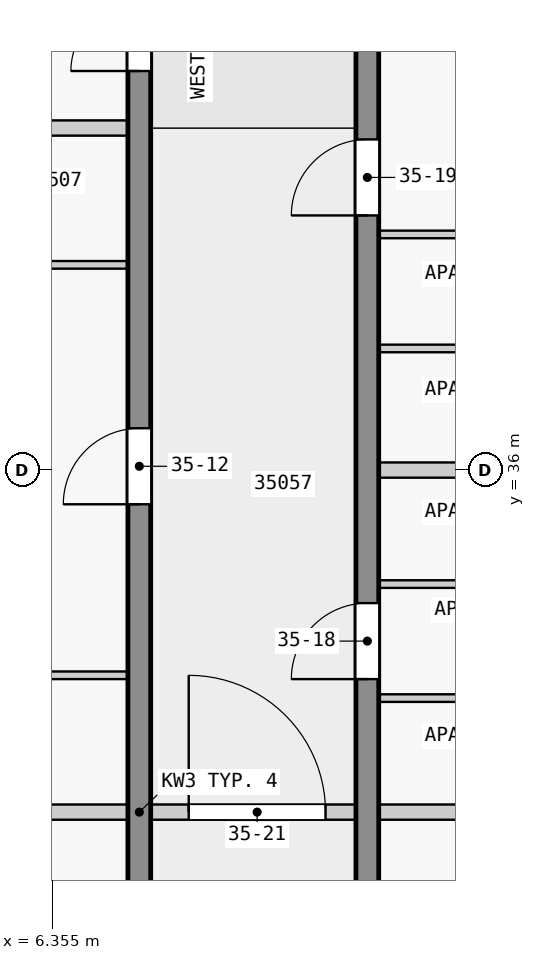
"""IFC4 building model, lengths in metres.
Left out: names, types, materials, properties, quantities, classifications, styles, units other than length and angle.
Written with IfcOpenShell. Run it as: python <this file> out.ifc"""

import sys

from ifc_helpers import new_model, si_unit, direction, frame, frame_2d, origin, place, context, subcontext, project, spatial, rectangle, extrude, element, fill, save


model = new_model("IFC4")
c1 = context("Model", 3, precision=1e-05, world=origin(), true_north=direction((0.0, 1.0)))
c2 = subcontext(c1, "Body", "Model", "MODEL_VIEW")
j1 = project(units=[si_unit("LENGTHUNIT", "METRE"), si_unit("PLANEANGLEUNIT", "RADIAN")], contexts=[c1])
p1 = place(None, origin())
s1 = spatial("IfcSite", under=j1, at=p1, CompositionType="ELEMENT")
p2 = place(p1, origin())
s2 = spatial("IfcBuilding", under=s1, at=p2, CompositionType="ELEMENT")
p3 = place(p2, frame((0.0, 0.0, 139.4)))
s3 = spatial("IfcBuildingStorey", under=s2, at=p3, CompositionType="ELEMENT", Elevation=139.4)
p4 = place(p3, frame((7.5, 18.0, 0.0), z_axis=(0.0, 0.0, 1.0), x_axis=(0.0, 1.0, 0.0)))
e1 = element("IfcWall", 1, at=p4, inside=s3, PredefinedType="SHEAR", context=c2, shape_type="SweptSolid", body=[
    extrude(rectangle(XDim=27.0, YDim=0.3, at=frame_2d((13.5, 0.0))), origin(), (0.0, 0.0, 1.0), 3.25),
])
p5 = place(p4, frame((4.05, 0.0, 0.0)))
e2 = element("IfcOpeningElement", 2, at=p5, cuts=e1, PredefinedType="OPENING", context=c2, shape_type="SweptSolid", body=[
    extrude(rectangle(XDim=1.0, YDim=2.1, at=frame_2d((0.5, 1.05))), frame((0.0, 0.16, 0.0), z_axis=(0.0, -1.0, 0.0), x_axis=(1.0, 0.0, 0.0)), (0.0, 0.0, 1.0), 0.32),
])
p6 = place(p4, frame((10.75, 0.0, 0.0)))
e3 = element("IfcOpeningElement", 3, at=p6, cuts=e1, PredefinedType="OPENING", context=c2, shape_type="SweptSolid", body=[
    extrude(rectangle(XDim=1.0, YDim=2.1, at=frame_2d((0.5, 1.05))), frame((0.0, 0.16, 0.0), z_axis=(0.0, -1.0, 0.0), x_axis=(1.0, 0.0, 0.0)), (0.0, 0.0, 1.0), 0.32),
])
p7 = place(p4, frame((17.55, 0.0, 0.0)))
e4 = element("IfcOpeningElement", 4, at=p7, cuts=e1, PredefinedType="OPENING", context=c2, shape_type="SweptSolid", body=[
    extrude(rectangle(XDim=1.0, YDim=2.1, at=frame_2d((0.5, 1.05))), frame((0.0, 0.16, 0.0), z_axis=(0.0, -1.0, 0.0), x_axis=(1.0, 0.0, 0.0)), (0.0, 0.0, 1.0), 0.32),
])
p8 = place(p4, frame((23.25, 0.0, 0.0)))
e5 = element("IfcOpeningElement", 5, at=p8, cuts=e1, PredefinedType="OPENING", context=c2, shape_type="SweptSolid", body=[
    extrude(rectangle(XDim=0.9, YDim=2.1, at=frame_2d((0.45, 1.05))), frame((0.0, 0.16, 0.0), z_axis=(0.0, -1.0, 0.0), x_axis=(1.0, 0.0, 0.0)), (0.0, 0.0, 1.0), 0.32),
])
p9 = place(p4, frame((25.45, 0.0, 0.0)))
e6 = element("IfcOpeningElement", 6, at=p9, cuts=e1, PredefinedType="OPENING", context=c2, shape_type="SweptSolid", body=[
    extrude(rectangle(XDim=1.0, YDim=2.1, at=frame_2d((0.5, 1.05))), frame((0.0, 0.16, 0.0), z_axis=(0.0, -1.0, 0.0), x_axis=(1.0, 0.0, 0.0)), (0.0, 0.0, 1.0), 0.32),
])
p10 = place(p3, frame((10.5, 18.0, 0.0), z_axis=(0.0, 0.0, 1.0), x_axis=(0.0, 1.0, 0.0)))
e7 = element("IfcWall", 7, at=p10, inside=s3, PredefinedType="SHEAR", context=c2, shape_type="SweptSolid", body=[
    extrude(rectangle(XDim=27.0, YDim=0.3, at=frame_2d((13.5, 0.0))), origin(), (0.0, 0.0, 1.0), 3.25),
])
p11 = place(p10, frame((1.75, 0.0, 0.0)))
e8 = element("IfcOpeningElement", 8, at=p11, cuts=e7, PredefinedType="OPENING", context=c2, shape_type="SweptSolid", body=[
    extrude(rectangle(XDim=1.0, YDim=2.1, at=frame_2d((0.5, 1.05))), frame((0.0, 0.16, 0.0), z_axis=(0.0, -1.0, 0.0), x_axis=(1.0, 0.0, 0.0)), (0.0, 0.0, 1.0), 0.32),
])
p12 = place(p10, frame((6.25, 0.0, 0.0)))
e9 = element("IfcOpeningElement", 9, at=p12, cuts=e7, PredefinedType="OPENING", context=c2, shape_type="SweptSolid", body=[
    extrude(rectangle(XDim=1.0, YDim=2.1, at=frame_2d((0.5, 1.05))), frame((0.0, 0.16, 0.0), z_axis=(0.0, -1.0, 0.0), x_axis=(1.0, 0.0, 0.0)), (0.0, 0.0, 1.0), 0.32),
])
p13 = place(p10, frame((10.35, 0.0, 0.0)))
e10 = element("IfcOpeningElement", 10, at=p13, cuts=e7, PredefinedType="OPENING", context=c2, shape_type="SweptSolid", body=[
    extrude(rectangle(XDim=1.8, YDim=2.1, at=frame_2d((0.9, 1.05))), frame((0.0, 0.16, 0.0), z_axis=(0.0, -1.0, 0.0), x_axis=(1.0, 0.0, 0.0)), (0.0, 0.0, 1.0), 0.32),
])
p14 = place(p10, frame((15.25, 0.0, 0.0)))
e11 = element("IfcOpeningElement", 11, at=p14, cuts=e7, PredefinedType="OPENING", context=c2, shape_type="SweptSolid", body=[
    extrude(rectangle(XDim=1.0, YDim=2.1, at=frame_2d((0.5, 1.05))), frame((0.0, 0.16, 0.0), z_axis=(0.0, -1.0, 0.0), x_axis=(1.0, 0.0, 0.0)), (0.0, 0.0, 1.0), 0.32),
])
p15 = place(p10, frame((21.35, 0.0, 0.0)))
e12 = element("IfcOpeningElement", 12, at=p15, cuts=e7, PredefinedType="OPENING", context=c2, shape_type="SweptSolid", body=[
    extrude(rectangle(XDim=1.0, YDim=2.1, at=frame_2d((0.5, 1.05))), frame((0.0, 0.16, 0.0), z_axis=(0.0, -1.0, 0.0), x_axis=(1.0, 0.0, 0.0)), (0.0, 0.0, 1.0), 0.32),
])
p16 = place(p3, frame((7.35, 31.5, 0.0), z_axis=(0.0, 0.0, 1.0), x_axis=(-1.0, 0.0, 0.0)))
e13 = element("IfcWall", 13, at=p16, inside=s3, PredefinedType="PARTITIONING", context=c2, shape_type="SweptSolid", body=[
    extrude(rectangle(XDim=3.3, YDim=0.2, at=frame_2d((1.65, 0.0))), origin(), (0.0, 0.0, 1.0), 3.25),
])
p17 = place(p3, frame((17.85, 31.5, 0.0), z_axis=(0.0, 0.0, 1.0), x_axis=(-1.0, 0.0, 0.0)))
e14 = element("IfcWall", 14, at=p17, inside=s3, PredefinedType="PARTITIONING", context=c2, shape_type="SweptSolid", body=[
    extrude(rectangle(XDim=7.2, YDim=0.2, at=frame_2d((3.6, 0.0))), origin(), (0.0, 0.0, 1.0), 3.25),
])
p18 = place(p3, frame((14.05, 33.0, 0.0), z_axis=(0.0, 0.0, 1.0), x_axis=(-1.0, 0.0, 0.0)))
e15 = element("IfcWall", 15, at=p18, inside=s3, PredefinedType="PARTITIONING", context=c2, shape_type="SweptSolid", body=[
    extrude(rectangle(XDim=3.4, YDim=0.1, at=frame_2d((1.7, 0.0))), origin(), (0.0, 0.0, 1.0), 3.25),
])
p19 = place(p18, frame((1.25, 0.0, 0.0)))
e16 = element("IfcOpeningElement", 16, at=p19, cuts=e15, PredefinedType="OPENING", context=c2, shape_type="SweptSolid", body=[
    extrude(rectangle(XDim=0.9, YDim=2.1, at=frame_2d((0.45, 1.05))), frame((0.0, 0.06, 0.0), z_axis=(0.0, -1.0, 0.0), x_axis=(1.0, 0.0, 0.0)), (0.0, 0.0, 1.0), 0.12),
])
p20 = place(p3, frame((7.35, 33.3, 0.0), z_axis=(0.0, 0.0, 1.0), x_axis=(-1.0, 0.0, 0.0)))
e17 = element("IfcWall", 17, at=p20, inside=s3, PredefinedType="PARTITIONING", context=c2, shape_type="SweptSolid", body=[
    extrude(rectangle(XDim=3.4, YDim=0.1, at=frame_2d((1.7, 0.0))), origin(), (0.0, 0.0, 1.0), 3.25),
])
p21 = place(p20, frame((1.25, 0.0, 0.0)))
e18 = element("IfcOpeningElement", 18, at=p21, cuts=e17, PredefinedType="OPENING", context=c2, shape_type="SweptSolid", body=[
    extrude(rectangle(XDim=0.9, YDim=2.1, at=frame_2d((0.45, 1.05))), frame((0.0, 0.06, 0.0), z_axis=(0.0, -1.0, 0.0), x_axis=(1.0, 0.0, 0.0)), (0.0, 0.0, 1.0), 0.12),
])
p22 = place(p3, frame((10.65, 34.5, 0.0), z_axis=(0.0, 0.0, 1.0), x_axis=(1.0, 0.0, 0.0)))
e19 = element("IfcWall", 19, at=p22, inside=s3, PredefinedType="PARTITIONING", context=c2, shape_type="SweptSolid", body=[
    extrude(rectangle(XDim=3.35, YDim=0.1, at=frame_2d((1.675, 0.0))), origin(), (0.0, 0.0, 1.0), 3.25),
])
p23 = place(p22, frame((1.25, 0.0, 0.0)))
e20 = element("IfcOpeningElement", 20, at=p23, cuts=e19, PredefinedType="OPENING", context=c2, shape_type="SweptSolid", body=[
    extrude(rectangle(XDim=0.9, YDim=2.1, at=frame_2d((0.45, 1.05))), frame((0.0, 0.06, 0.0), z_axis=(0.0, -1.0, 0.0), x_axis=(1.0, 0.0, 0.0)), (0.0, 0.0, 1.0), 0.12),
])
p24 = place(p3, frame((14.05, 36.0, 0.0), z_axis=(0.0, 0.0, 1.0), x_axis=(-1.0, 0.0, 0.0)))
e21 = element("IfcWall", 21, at=p24, inside=s3, PredefinedType="PARTITIONING", context=c2, shape_type="SweptSolid", body=[
    extrude(rectangle(XDim=3.4, YDim=0.2, at=frame_2d((1.7, 0.0))), origin(), (0.0, 0.0, 1.0), 3.25),
])
p25 = place(p3, frame((14.0, 37.6, 0.0), z_axis=(0.0, 0.0, 1.0), x_axis=(-1.0, 0.0, 0.0)))
e22 = element("IfcWall", 22, at=p25, inside=s3, PredefinedType="PARTITIONING", context=c2, shape_type="SweptSolid", body=[
    extrude(rectangle(XDim=3.35, YDim=0.1, at=frame_2d((1.675, 0.0))), origin(), (0.0, 0.0, 1.0), 3.25),
])
p26 = place(p3, frame((3.95, 38.7, 0.0), z_axis=(0.0, 0.0, 1.0), x_axis=(1.0, 0.0, 0.0)))
e23 = element("IfcWall", 23, at=p26, inside=s3, PredefinedType="PARTITIONING", context=c2, shape_type="SweptSolid", body=[
    extrude(rectangle(XDim=3.4, YDim=0.1, at=frame_2d((1.7, 0.0))), origin(), (0.0, 0.0, 1.0), 3.25),
])
p27 = place(p26, frame((1.25, 0.0, 0.0)))
e24 = element("IfcOpeningElement", 24, at=p27, cuts=e23, PredefinedType="OPENING", context=c2, shape_type="SweptSolid", body=[
    extrude(rectangle(XDim=0.9, YDim=2.1, at=frame_2d((0.45, 1.05))), frame((0.0, 0.06, 0.0), z_axis=(0.0, -1.0, 0.0), x_axis=(1.0, 0.0, 0.0)), (0.0, 0.0, 1.0), 0.12),
])
p28 = place(p3, frame((14.0, 39.1, 0.0), z_axis=(0.0, 0.0, 1.0), x_axis=(-1.0, 0.0, 0.0)))
e25 = element("IfcWall", 25, at=p28, inside=s3, PredefinedType="PARTITIONING", context=c2, shape_type="SweptSolid", body=[
    extrude(rectangle(XDim=3.35, YDim=0.1, at=frame_2d((1.675, 0.0))), origin(), (0.0, 0.0, 1.0), 3.25),
])
p29 = place(p28, frame((1.25, 0.0, 0.0)))
e26 = element("IfcOpeningElement", 26, at=p29, cuts=e25, PredefinedType="OPENING", context=c2, shape_type="SweptSolid", body=[
    extrude(rectangle(XDim=0.9, YDim=2.1, at=frame_2d((0.45, 1.05))), frame((0.0, 0.06, 0.0), z_axis=(0.0, -1.0, 0.0), x_axis=(1.0, 0.0, 0.0)), (0.0, 0.0, 1.0), 0.12),
])
p30 = place(p3, frame((7.35, 40.5, 0.0), z_axis=(0.0, 0.0, 1.0), x_axis=(-1.0, 0.0, 0.0)))
e27 = element("IfcWall", 27, at=p30, inside=s3, PredefinedType="PARTITIONING", context=c2, shape_type="SweptSolid", body=[
    extrude(rectangle(XDim=7.43, YDim=0.2, at=frame_2d((3.715, 0.0))), origin(), (0.0, 0.0, 1.0), 3.25),
])
p31 = place(p3, frame((7.45, 31.5, 0.0), z_axis=(0.0, 0.0, 1.0), x_axis=(1.0, 0.0, 0.0)))
e28 = element("IfcWall", 28, at=p31, inside=s3, PredefinedType="PARTITIONING", context=c2, shape_type="SweptSolid", body=[
    extrude(rectangle(XDim=3.1, YDim=0.2, at=frame_2d((1.55, 0.0))), origin(), (0.0, 0.0, 1.0), 3.25),
])
p32 = place(p31, frame((0.7, 0.0, 0.0)))
e29 = element("IfcOpeningElement", 29, at=p32, cuts=e28, PredefinedType="OPENING", context=c2, shape_type="SweptSolid", body=[
    extrude(rectangle(XDim=1.8, YDim=2.1, at=frame_2d((0.9, 1.05))), frame((0.0, 0.11, 0.0), z_axis=(0.0, -1.0, 0.0), x_axis=(1.0, 0.0, 0.0)), (0.0, 0.0, 1.0), 0.22),
])
p33 = place(p7, origin())
e30 = element("IfcDoor", 30, at=p33, inside=s3, OperationType="SINGLE_SWING_RIGHT", PredefinedType="DOOR", context=c2, shape_type="SweptSolid", body=[
    extrude(rectangle(XDim=1.0, YDim=2.1, at=frame_2d((0.5, 1.05))), frame((0.0, 0.025, 0.0), z_axis=(0.0, -1.0, 0.0), x_axis=(1.0, 0.0, 0.0)), (0.0, 0.0, 1.0), 0.05),
])
fill(e4, e30)
p34 = place(p8, origin())
e31 = element("IfcDoor", 31, at=p34, inside=s3, OperationType="SINGLE_SWING_RIGHT", PredefinedType="DOOR", context=c2, shape_type="SweptSolid", body=[
    extrude(rectangle(XDim=0.9, YDim=2.1, at=frame_2d((0.45, 1.05))), frame((0.0, 0.025, 0.0), z_axis=(0.0, -1.0, 0.0), x_axis=(1.0, 0.0, 0.0)), (0.0, 0.0, 1.0), 0.05),
])
fill(e5, e31)
p35 = place(p14, origin())
e32 = element("IfcDoor", 32, at=p35, inside=s3, OperationType="SINGLE_SWING_RIGHT", PredefinedType="DOOR", context=c2, shape_type="SweptSolid", body=[
    extrude(rectangle(XDim=1.0, YDim=2.1, at=frame_2d((0.5, 1.05))), frame((0.0, 0.025, 0.0), z_axis=(0.0, -1.0, 0.0), x_axis=(1.0, 0.0, 0.0)), (0.0, 0.0, 1.0), 0.05),
])
fill(e11, e32)
p36 = place(p15, origin())
e33 = element("IfcDoor", 33, at=p36, inside=s3, OperationType="SINGLE_SWING_RIGHT", PredefinedType="DOOR", context=c2, shape_type="SweptSolid", body=[
    extrude(rectangle(XDim=1.0, YDim=2.1, at=frame_2d((0.5, 1.05))), frame((0.0, 0.025, 0.0), z_axis=(0.0, -1.0, 0.0), x_axis=(1.0, 0.0, 0.0)), (0.0, 0.0, 1.0), 0.05),
])
fill(e12, e33)
p37 = place(p32, origin())
e34 = element("IfcDoor", 34, at=p37, inside=s3, OperationType="SINGLE_SWING_RIGHT", PredefinedType="DOOR", context=c2, shape_type="SweptSolid", body=[
    extrude(rectangle(XDim=1.8, YDim=2.1, at=frame_2d((0.9, 1.05))), frame((0.0, 0.025, 0.0), z_axis=(0.0, -1.0, 0.0), x_axis=(1.0, 0.0, 0.0)), (0.0, 0.0, 1.0), 0.05),
])
fill(e29, e34)
save(model, sys.argv[1])
